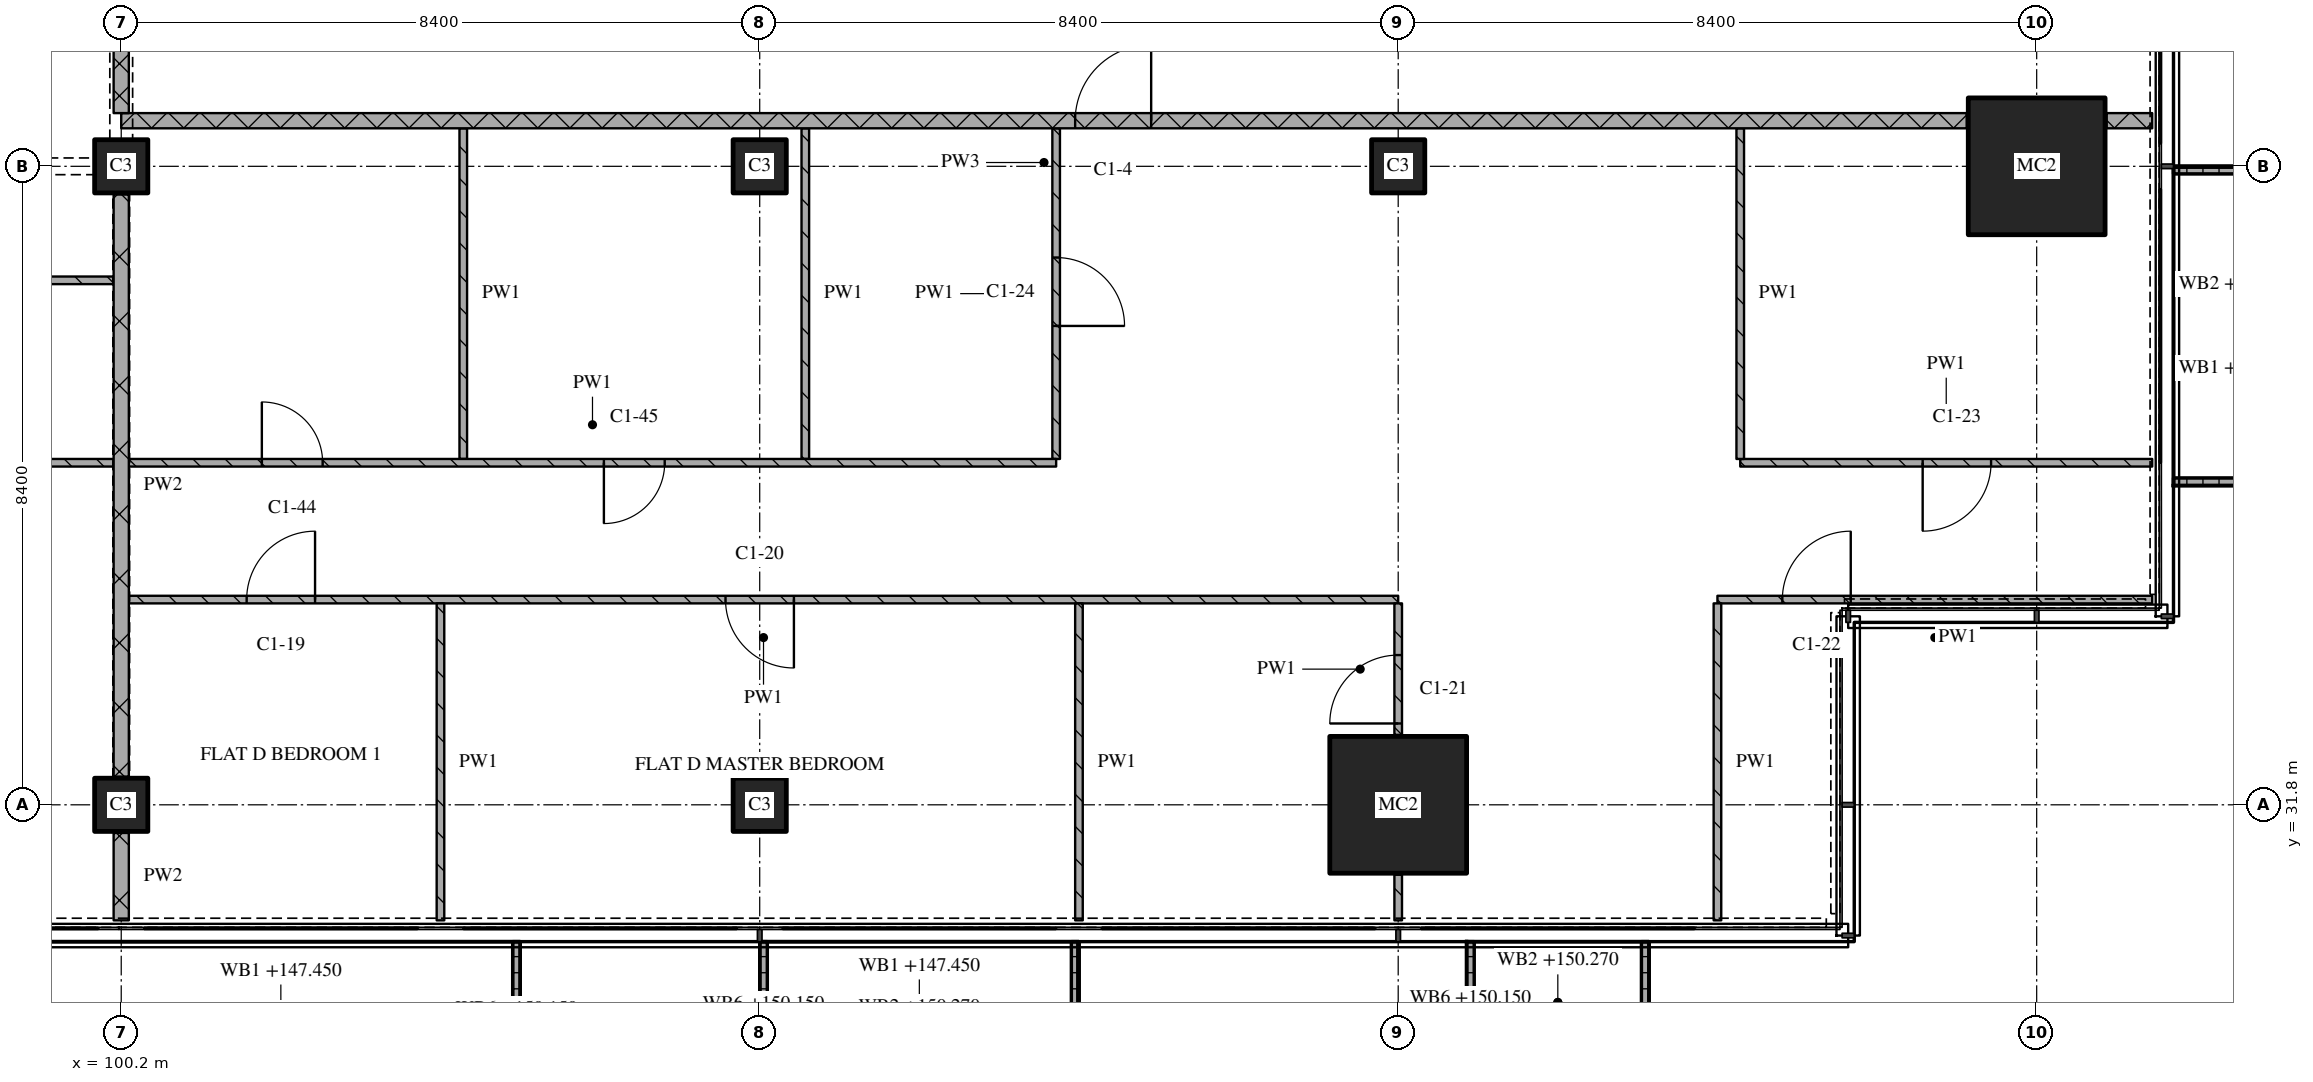
"""IFC4 building model, lengths in metres.
Left out: names, types, materials, properties, quantities, classifications, styles, units other than length and angle.
Written with IfcOpenShell. Run it as: python <this file> out.ifc"""

import sys

from ifc_helpers import new_model, si_unit, direction, frame, frame_2d, origin, origin_2d, place, context, subcontext, project, spatial, polyline, rectangle, outline, extrude, element, fill, save


model = new_model("IFC4")
c1 = context("Model", 3, precision=1e-05, world=origin(), true_north=direction((0.0, 1.0)))
c2 = subcontext(c1, "Body", "Model", "MODEL_VIEW")
j1 = project(units=[si_unit("LENGTHUNIT", "METRE"), si_unit("PLANEANGLEUNIT", "RADIAN")], contexts=[c1])
p1 = place(None, origin())
s1 = spatial("IfcSite", under=j1, at=p1, CompositionType="ELEMENT")
p2 = place(p1, origin())
s2 = spatial("IfcBuilding", under=s1, at=p2, CompositionType="ELEMENT")
p3 = place(p2, frame((0.0, 0.0, 147.45)))
s3 = spatial("IfcBuildingStorey", under=s2, at=p3, CompositionType="ELEMENT", Elevation=147.45)
for number, where, z_axis, x_axis in (
    (1, (100.2, 31.8, 0.0), (0.0, 0.0, 1.0), (1.0, 0.0, 0.0)),
    (2, (100.2, 40.2, 0.0), (0.0, 0.0, 1.0), (1.0, 0.0, 0.0)),
    (3, (108.6, 31.8, 0.0), (0.0, 0.0, 1.0), (1.0, 0.0, 0.0)),
    (4, (108.6, 40.2, 0.0), (0.0, 0.0, 1.0), (1.0, 0.0, 0.0)),
):
    element("IfcColumn", number, at=place(p3, frame(where, z_axis=z_axis, x_axis=x_axis)), inside=s3, PredefinedType="COLUMN", context=c2, shape_type="SweptSolid", body=[
        extrude(rectangle(XDim=0.7, YDim=0.7, at=origin_2d()), origin(), (0.0, 0.0, 1.0), 3.6),
    ])
p4 = place(p3, frame((117.0, 31.8, 0.0), z_axis=(0.0, 0.0, 1.0), x_axis=(1.0, 0.0, 0.0)))
e5 = element("IfcColumn", 5, at=p4, inside=s3, PredefinedType="COLUMN", context=c2, shape_type="SweptSolid", body=[
    extrude(rectangle(XDim=1.8, YDim=1.8, at=origin_2d()), origin(), (0.0, 0.0, 1.0), 3.6),
])
p5 = place(p3, frame((117.0, 40.2, 0.0), z_axis=(0.0, 0.0, 1.0), x_axis=(1.0, 0.0, 0.0)))
e6 = element("IfcColumn", 6, at=p5, inside=s3, PredefinedType="COLUMN", context=c2, shape_type="SweptSolid", body=[
    extrude(rectangle(XDim=0.7, YDim=0.7, at=origin_2d()), origin(), (0.0, 0.0, 1.0), 3.6),
])
p6 = place(p3, frame((125.4, 40.2, 0.0), z_axis=(0.0, 0.0, 1.0), x_axis=(1.0, 0.0, 0.0)))
e7 = element("IfcColumn", 7, at=p6, inside=s3, PredefinedType="COLUMN", context=c2, shape_type="SweptSolid", body=[
    extrude(rectangle(XDim=1.8, YDim=1.8, at=origin_2d()), origin(), (0.0, 0.0, 1.0), 3.6),
])
p7 = place(p3, origin())
e8 = element("IfcWall", 8, at=p7, inside=s3, PredefinedType="SOLIDWALL", context=c2, shape_type="SweptSolid", body=[
    extrude(outline(polyline([(99.15, 30.0), (99.25, 30.0), (99.25, 28.233), (105.35, 28.233), (105.35, 30.0), (105.45, 30.0), (105.45, 28.133), (99.15, 28.133), (99.15, 30.0)])), origin(), (0.0, 0.0, 1.0), 1.0),
])
p8 = place(p3, origin())
e9 = element("IfcWall", 9, at=p8, inside=s3, PredefinedType="SOLIDWALL", context=c2, shape_type="SweptSolid", body=[
    extrude(outline(polyline([(108.6, 30.0), (108.7, 30.0), (108.7, 28.367), (112.7, 28.367), (112.7, 30.0), (112.8, 30.0), (112.8, 28.267), (108.6, 28.267), (108.6, 30.0)])), origin(), (0.0, 0.0, 1.0), 1.0),
])
p9 = place(p3, origin())
e10 = element("IfcWall", 10, at=p9, inside=s3, PredefinedType="SOLIDWALL", context=c2, shape_type="SweptSolid", body=[
    extrude(outline(polyline([(117.9, 30.0), (118.0, 30.0), (118.0, 28.5), (120.2, 28.5), (120.2, 30.0), (120.3, 30.0), (120.3, 28.4), (117.9, 28.4), (117.9, 30.0)])), origin(), (0.0, 0.0, 1.0), 1.0),
])
p10 = place(p3, origin())
e11 = element("IfcWall", 11, at=p10, inside=s3, PredefinedType="SOLIDWALL", context=c2, shape_type="SweptSolid", body=[
    extrude(outline(polyline([(127.2, 36.0), (127.2, 36.1), (128.833, 36.1), (128.833, 40.1), (127.2, 40.1), (127.2, 40.2), (128.933, 40.2), (128.933, 36.0), (127.2, 36.0)])), origin(), (0.0, 0.0, 1.0), 1.0),
])
p11 = place(p3, frame((117.0, 34.5, 0.0), z_axis=(0.0, 0.0, 1.0), x_axis=(-1.0, 0.0, 0.0)))
e12 = element("IfcWall", 12, at=p11, inside=s3, PredefinedType="PARTITIONING", context=c2, shape_type="SweptSolid", body=[
    extrude(rectangle(XDim=16.7, YDim=0.1, at=frame_2d((8.35, 0.0))), origin(), (0.0, 0.0, 1.0), 3.32),
])
p12 = place(p11, frame((7.95, 0.0, 0.0)))
e13 = element("IfcOpeningElement", 13, at=p12, cuts=e12, PredefinedType="OPENING", context=c2, shape_type="SweptSolid", body=[
    extrude(rectangle(XDim=0.9, YDim=2.1, at=frame_2d((0.45, 1.05))), frame((0.0, 0.06, 0.0), z_axis=(0.0, -1.0, 0.0), x_axis=(1.0, 0.0, 0.0)), (0.0, 0.0, 1.0), 0.12),
])
p13 = place(p11, frame((14.25, 0.0, 0.0)))
e14 = element("IfcOpeningElement", 14, at=p13, cuts=e12, PredefinedType="OPENING", context=c2, shape_type="SweptSolid", body=[
    extrude(rectangle(XDim=0.9, YDim=2.1, at=frame_2d((0.45, 1.05))), frame((0.0, 0.06, 0.0), z_axis=(0.0, -1.0, 0.0), x_axis=(1.0, 0.0, 0.0)), (0.0, 0.0, 1.0), 0.12),
])
p14 = place(p3, frame((126.92, 34.5, 0.0), z_axis=(0.0, 0.0, 1.0), x_axis=(-1.0, 0.0, 0.0)))
e15 = element("IfcWall", 15, at=p14, inside=s3, PredefinedType="PARTITIONING", context=c2, shape_type="SweptSolid", body=[
    extrude(rectangle(XDim=5.72, YDim=0.1, at=frame_2d((2.86, 0.0))), origin(), (0.0, 0.0, 1.0), 3.32),
])
p15 = place(p14, frame((3.966, 0.0, 0.0)))
e16 = element("IfcOpeningElement", 16, at=p15, cuts=e15, PredefinedType="OPENING", context=c2, shape_type="SweptSolid", body=[
    extrude(rectangle(XDim=0.9, YDim=2.1, at=frame_2d((0.45, 1.05))), frame((0.0, 0.06, 0.0), z_axis=(0.0, -1.0, 0.0), x_axis=(1.0, 0.0, 0.0)), (0.0, 0.0, 1.0), 0.12),
])
p16 = place(p3, frame((121.5, 36.3, 0.0), z_axis=(0.0, 0.0, 1.0), x_axis=(1.0, 0.0, 0.0)))
e17 = element("IfcWall", 17, at=p16, inside=s3, PredefinedType="PARTITIONING", context=c2, shape_type="SweptSolid", body=[
    extrude(rectangle(XDim=5.42, YDim=0.1, at=frame_2d((2.71, 0.0))), origin(), (0.0, 0.0, 1.0), 3.32),
])
p17 = place(p16, frame((2.4, 0.0, 0.0)))
e18 = element("IfcOpeningElement", 18, at=p17, cuts=e17, PredefinedType="OPENING", context=c2, shape_type="SweptSolid", body=[
    extrude(rectangle(XDim=0.9, YDim=2.1, at=frame_2d((0.45, 1.05))), frame((0.0, 0.06, 0.0), z_axis=(0.0, -1.0, 0.0), x_axis=(1.0, 0.0, 0.0)), (0.0, 0.0, 1.0), 0.12),
])
p18 = place(p3, frame((93.0, 38.7, 0.0), z_axis=(0.0, 0.0, 1.0), x_axis=(1.0, 0.0, 0.0)))
e19 = element("IfcWall", 19, at=p18, inside=s3, PredefinedType="PARTITIONING", context=c2, shape_type="SweptSolid", body=[
    extrude(rectangle(XDim=7.1, YDim=0.1, at=frame_2d((3.55, 0.0))), origin(), (0.0, 0.0, 1.0), 3.32),
])
p19 = place(p18, frame((5.45, 0.0, 0.0)))
e20 = element("IfcOpeningElement", 20, at=p19, cuts=e19, PredefinedType="OPENING", context=c2, shape_type="SweptSolid", body=[
    extrude(rectangle(XDim=0.8, YDim=2.1, at=frame_2d((0.4, 1.05))), frame((0.0, 0.06, 0.0), z_axis=(0.0, -1.0, 0.0), x_axis=(1.0, 0.0, 0.0)), (0.0, 0.0, 1.0), 0.12),
])
p20 = place(p3, frame((124.48, 40.8, 0.0), z_axis=(0.0, 0.0, 1.0), x_axis=(-1.0, 0.0, 0.0)))
e21 = element("IfcWall", 21, at=p20, inside=s3, PredefinedType="PARTITIONING", context=c2, shape_type="SweptSolid", body=[
    extrude(rectangle(XDim=24.28, YDim=0.2, at=frame_2d((12.14, 0.0))), origin(), (0.0, 0.0, 1.0), 3.32),
])
p21 = place(p20, frame((10.73, 0.0, 0.0)))
e22 = element("IfcOpeningElement", 22, at=p21, cuts=e21, PredefinedType="OPENING", context=c2, shape_type="SweptSolid", body=[
    extrude(rectangle(XDim=1.0, YDim=2.1, at=frame_2d((0.5, 1.05))), frame((0.0, 0.11, 0.0), z_axis=(0.0, -1.0, 0.0), x_axis=(1.0, 0.0, 0.0)), (0.0, 0.0, 1.0), 0.22),
])
p22 = place(p3, frame((126.32, 40.8, 0.0), z_axis=(0.0, 0.0, 1.0), x_axis=(1.0, 0.0, 0.0)))
e23 = element("IfcWall", 23, at=p22, inside=s3, PredefinedType="PARTITIONING", context=c2, shape_type="SweptSolid", body=[
    extrude(rectangle(XDim=0.6, YDim=0.2, at=frame_2d((0.3, 0.0))), origin(), (0.0, 0.0, 1.0), 3.32),
])
p23 = place(p3, frame((100.2, 43.1, 0.0), z_axis=(0.0, 0.0, 1.0), x_axis=(0.0, -1.0, 0.0)))
e24 = element("IfcWall", 24, at=p23, inside=s3, PredefinedType="PARTITIONING", context=c2, shape_type="SweptSolid", body=[
    extrude(rectangle(XDim=2.2, YDim=0.2, at=frame_2d((1.1, 0.0))), origin(), (0.0, 0.0, 1.0), 2.43),
])
p24 = place(p3, frame((100.2, 31.43, 0.0), z_axis=(0.0, 0.0, 1.0), x_axis=(0.0, -1.0, 0.0)))
e25 = element("IfcWall", 25, at=p24, inside=s3, PredefinedType="PARTITIONING", context=c2, shape_type="SweptSolid", body=[
    extrude(rectangle(XDim=1.15, YDim=0.2, at=frame_2d((0.575, 0.0))), origin(), (0.0, 0.0, 1.0), 3.32),
])
p25 = place(p3, frame((100.2, 39.83, 0.0), z_axis=(0.0, 0.0, 1.0), x_axis=(0.0, -1.0, 0.0)))
e26 = element("IfcWall", 26, at=p25, inside=s3, PredefinedType="PARTITIONING", context=c2, shape_type="SweptSolid", body=[
    extrude(rectangle(XDim=7.66, YDim=0.2, at=frame_2d((3.83, 0.0))), origin(), (0.0, 0.0, 1.0), 2.72),
])
p26 = place(p3, frame((104.4, 34.45, 0.0), z_axis=(0.0, 0.0, 1.0), x_axis=(0.0, -1.0, 0.0)))
e27 = element("IfcWall", 27, at=p26, inside=s3, PredefinedType="PARTITIONING", context=c2, shape_type="SweptSolid", body=[
    extrude(rectangle(XDim=4.17, YDim=0.1, at=frame_2d((2.085, 0.0))), origin(), (0.0, 0.0, 1.0), 3.32),
])
for number, where, z_axis, x_axis in (
    (28, (104.7, 40.7, 0.0), (0.0, 0.0, 1.0), (0.0, -1.0, 0.0)),
    (29, (109.2, 40.7, 0.0), (0.0, 0.0, 1.0), (0.0, -1.0, 0.0)),
):
    element("IfcWall", number, at=place(p3, frame(where, z_axis=z_axis, x_axis=x_axis)), inside=s3, PredefinedType="PARTITIONING", context=c2, shape_type="SweptSolid", body=[
        extrude(rectangle(XDim=4.35, YDim=0.1, at=frame_2d((2.175, 0.0))), origin(), (0.0, 0.0, 1.0), 3.32),
    ])
p27 = place(p3, frame((112.5, 36.35, 0.0), z_axis=(0.0, 0.0, 1.0), x_axis=(0.0, 1.0, 0.0)))
e30 = element("IfcWall", 30, at=p27, inside=s3, PredefinedType="PARTITIONING", context=c2, shape_type="SweptSolid", body=[
    extrude(rectangle(XDim=4.35, YDim=0.1, at=frame_2d((2.175, 0.0))), origin(), (0.0, 0.0, 1.0), 3.32),
])
p28 = place(p27, frame((1.75, 0.0, 0.0)))
e31 = element("IfcOpeningElement", 31, at=p28, cuts=e30, PredefinedType="OPENING", context=c2, shape_type="SweptSolid", body=[
    extrude(rectangle(XDim=0.9, YDim=2.1, at=frame_2d((0.45, 1.05))), frame((0.0, 0.06, 0.0), z_axis=(0.0, -1.0, 0.0), x_axis=(1.0, 0.0, 0.0)), (0.0, 0.0, 1.0), 0.12),
])
p29 = place(p3, frame((112.8, 34.45, 0.0), z_axis=(0.0, 0.0, 1.0), x_axis=(0.0, -1.0, 0.0)))
e32 = element("IfcWall", 32, at=p29, inside=s3, PredefinedType="PARTITIONING", context=c2, shape_type="SweptSolid", body=[
    extrude(rectangle(XDim=4.17, YDim=0.1, at=frame_2d((2.085, 0.0))), origin(), (0.0, 0.0, 1.0), 3.32),
])
p30 = place(p3, frame((117.0, 30.88, 0.0), z_axis=(0.0, 0.0, 1.0), x_axis=(0.0, -1.0, 0.0)))
e33 = element("IfcWall", 33, at=p30, inside=s3, PredefinedType="PARTITIONING", context=c2, shape_type="SweptSolid", body=[
    extrude(rectangle(XDim=0.6, YDim=0.1, at=frame_2d((0.3, 0.0))), origin(), (0.0, 0.0, 1.0), 3.32),
])
p31 = place(p3, frame((117.0, 32.72, 0.0), z_axis=(0.0, 0.0, 1.0), x_axis=(0.0, 1.0, 0.0)))
e34 = element("IfcWall", 34, at=p31, inside=s3, PredefinedType="PARTITIONING", context=c2, shape_type="SweptSolid", body=[
    extrude(rectangle(XDim=1.73, YDim=0.1, at=frame_2d((0.865, 0.0))), origin(), (0.0, 0.0, 1.0), 3.32),
])
p32 = place(p31, frame((0.15, 0.0, 0.0)))
e35 = element("IfcOpeningElement", 35, at=p32, cuts=e34, PredefinedType="OPENING", context=c2, shape_type="SweptSolid", body=[
    extrude(rectangle(XDim=0.9, YDim=2.1, at=frame_2d((0.45, 1.05))), frame((0.0, 0.06, 0.0), z_axis=(0.0, -1.0, 0.0), x_axis=(1.0, 0.0, 0.0)), (0.0, 0.0, 1.0), 0.12),
])
p33 = place(p3, frame((121.2, 34.45, 0.0), z_axis=(0.0, 0.0, 1.0), x_axis=(0.0, -1.0, 0.0)))
e36 = element("IfcWall", 36, at=p33, inside=s3, PredefinedType="PARTITIONING", context=c2, shape_type="SweptSolid", body=[
    extrude(rectangle(XDim=4.17, YDim=0.1, at=frame_2d((2.085, 0.0))), origin(), (0.0, 0.0, 1.0), 3.32),
])
p34 = place(p3, frame((121.5, 40.7, 0.0), z_axis=(0.0, 0.0, 1.0), x_axis=(0.0, -1.0, 0.0)))
e37 = element("IfcWall", 37, at=p34, inside=s3, PredefinedType="PARTITIONING", context=c2, shape_type="SweptSolid", body=[
    extrude(rectangle(XDim=4.35, YDim=0.1, at=frame_2d((2.175, 0.0))), origin(), (0.0, 0.0, 1.0), 3.32),
])
p35 = place(p3, frame((100.1, 36.3, 0.0), z_axis=(0.0, 0.0, 1.0), x_axis=(-1.0, 0.0, 0.0)))
e38 = element("IfcWall", 38, at=p35, inside=s3, PredefinedType="PARTITIONING", context=c2, shape_type="SweptSolid", body=[
    extrude(rectangle(XDim=12.5, YDim=0.1, at=frame_2d((6.25, 0.0))), origin(), (0.0, 0.0, 1.0), 3.32),
])
p36 = place(p35, frame((3.65, 0.0, 0.0)))
e39 = element("IfcOpeningElement", 39, at=p36, cuts=e38, PredefinedType="OPENING", context=c2, shape_type="SweptSolid", body=[
    extrude(rectangle(XDim=0.9, YDim=2.1, at=frame_2d((0.45, 1.05))), frame((0.0, 0.06, 0.0), z_axis=(0.0, -1.0, 0.0), x_axis=(1.0, 0.0, 0.0)), (0.0, 0.0, 1.0), 0.12),
])
p37 = place(p35, frame((9.95, 0.0, 0.0)))
e40 = element("IfcOpeningElement", 40, at=p37, cuts=e38, PredefinedType="OPENING", context=c2, shape_type="SweptSolid", body=[
    extrude(rectangle(XDim=0.9, YDim=2.1, at=frame_2d((0.45, 1.05))), frame((0.0, 0.06, 0.0), z_axis=(0.0, -1.0, 0.0), x_axis=(1.0, 0.0, 0.0)), (0.0, 0.0, 1.0), 0.12),
])
p38 = place(p3, frame((100.3, 36.3, 0.0), z_axis=(0.0, 0.0, 1.0), x_axis=(1.0, 0.0, 0.0)))
e41 = element("IfcWall", 41, at=p38, inside=s3, PredefinedType="PARTITIONING", context=c2, shape_type="SweptSolid", body=[
    extrude(rectangle(XDim=12.2, YDim=0.1, at=frame_2d((6.1, 0.0))), origin(), (0.0, 0.0, 1.0), 3.32),
])
p39 = place(p38, frame((1.75, 0.0, 0.0)))
e42 = element("IfcOpeningElement", 42, at=p39, cuts=e41, PredefinedType="OPENING", context=c2, shape_type="SweptSolid", body=[
    extrude(rectangle(XDim=0.8, YDim=2.1, at=frame_2d((0.4, 1.05))), frame((0.0, 0.06, 0.0), z_axis=(0.0, -1.0, 0.0), x_axis=(1.0, 0.0, 0.0)), (0.0, 0.0, 1.0), 0.12),
])
p40 = place(p38, frame((6.25, 0.0, 0.0)))
e43 = element("IfcOpeningElement", 43, at=p40, cuts=e41, PredefinedType="OPENING", context=c2, shape_type="SweptSolid", body=[
    extrude(rectangle(XDim=0.8, YDim=2.1, at=frame_2d((0.4, 1.05))), frame((0.0, 0.06, 0.0), z_axis=(0.0, -1.0, 0.0), x_axis=(1.0, 0.0, 0.0)), (0.0, 0.0, 1.0), 0.12),
])
p41 = place(p12, origin())
e44 = element("IfcDoor", 44, at=p41, inside=s3, OperationType="SINGLE_SWING_LEFT", PredefinedType="DOOR", context=c2, shape_type="SweptSolid", body=[
    extrude(rectangle(XDim=0.9, YDim=2.1, at=frame_2d((0.45, 1.05))), frame((0.0, 0.025, 0.0), z_axis=(0.0, -1.0, 0.0), x_axis=(1.0, 0.0, 0.0)), (0.0, 0.0, 1.0), 0.05),
])
fill(e13, e44)
p42 = place(p13, origin())
e45 = element("IfcDoor", 45, at=p42, inside=s3, OperationType="SINGLE_SWING_RIGHT", PredefinedType="DOOR", context=c2, shape_type="SweptSolid", body=[
    extrude(rectangle(XDim=0.9, YDim=2.1, at=frame_2d((0.45, 1.05))), frame((0.0, 0.025, 0.0), z_axis=(0.0, -1.0, 0.0), x_axis=(1.0, 0.0, 0.0)), (0.0, 0.0, 1.0), 0.05),
])
fill(e14, e45)
p43 = place(p15, origin())
e46 = element("IfcDoor", 46, at=p43, inside=s3, OperationType="SINGLE_SWING_RIGHT", PredefinedType="DOOR", context=c2, shape_type="SweptSolid", body=[
    extrude(rectangle(XDim=0.9, YDim=2.1, at=frame_2d((0.45, 1.05))), frame((0.0, 0.025, 0.0), z_axis=(0.0, -1.0, 0.0), x_axis=(1.0, 0.0, 0.0)), (0.0, 0.0, 1.0), 0.05),
])
fill(e16, e46)
p44 = place(p17, origin())
e47 = element("IfcDoor", 47, at=p44, inside=s3, OperationType="SINGLE_SWING_RIGHT", PredefinedType="DOOR", context=c2, shape_type="SweptSolid", body=[
    extrude(rectangle(XDim=0.9, YDim=2.1, at=frame_2d((0.45, 1.05))), frame((0.0, 0.025, 0.0), z_axis=(0.0, -1.0, 0.0), x_axis=(1.0, 0.0, 0.0)), (0.0, 0.0, 1.0), 0.05),
])
fill(e18, e47)
p45 = place(p21, origin())
e48 = element("IfcDoor", 48, at=p45, inside=s3, OperationType="SINGLE_SWING_RIGHT", PredefinedType="DOOR", context=c2, shape_type="SweptSolid", body=[
    extrude(rectangle(XDim=1.0, YDim=2.1, at=frame_2d((0.5, 1.05))), frame((0.0, 0.025, 0.0), z_axis=(0.0, -1.0, 0.0), x_axis=(1.0, 0.0, 0.0)), (0.0, 0.0, 1.0), 0.05),
])
fill(e22, e48)
p46 = place(p28, origin())
e49 = element("IfcDoor", 49, at=p46, inside=s3, OperationType="SINGLE_SWING_RIGHT", PredefinedType="DOOR", context=c2, shape_type="SweptSolid", body=[
    extrude(rectangle(XDim=0.9, YDim=2.1, at=frame_2d((0.45, 1.05))), frame((0.0, 0.025, 0.0), z_axis=(0.0, -1.0, 0.0), x_axis=(1.0, 0.0, 0.0)), (0.0, 0.0, 1.0), 0.05),
])
fill(e31, e49)
p47 = place(p32, origin())
e50 = element("IfcDoor", 50, at=p47, inside=s3, OperationType="SINGLE_SWING_LEFT", PredefinedType="DOOR", context=c2, shape_type="SweptSolid", body=[
    extrude(rectangle(XDim=0.9, YDim=2.1, at=frame_2d((0.45, 1.05))), frame((0.0, 0.025, 0.0), z_axis=(0.0, -1.0, 0.0), x_axis=(1.0, 0.0, 0.0)), (0.0, 0.0, 1.0), 0.05),
])
fill(e35, e50)
p48 = place(p39, origin())
e51 = element("IfcDoor", 51, at=p48, inside=s3, OperationType="SINGLE_SWING_LEFT", PredefinedType="DOOR", context=c2, shape_type="SweptSolid", body=[
    extrude(rectangle(XDim=0.8, YDim=2.1, at=frame_2d((0.4, 1.05))), frame((0.0, 0.025, 0.0), z_axis=(0.0, -1.0, 0.0), x_axis=(1.0, 0.0, 0.0)), (0.0, 0.0, 1.0), 0.05),
])
fill(e42, e51)
p49 = place(p40, origin())
e52 = element("IfcDoor", 52, at=p49, inside=s3, OperationType="SINGLE_SWING_RIGHT", PredefinedType="DOOR", context=c2, shape_type="SweptSolid", body=[
    extrude(rectangle(XDim=0.8, YDim=2.1, at=frame_2d((0.4, 1.05))), frame((0.0, 0.025, 0.0), z_axis=(0.0, -1.0, 0.0), x_axis=(1.0, 0.0, 0.0)), (0.0, 0.0, 1.0), 0.05),
])
fill(e43, e52)
save(model, sys.argv[1])
